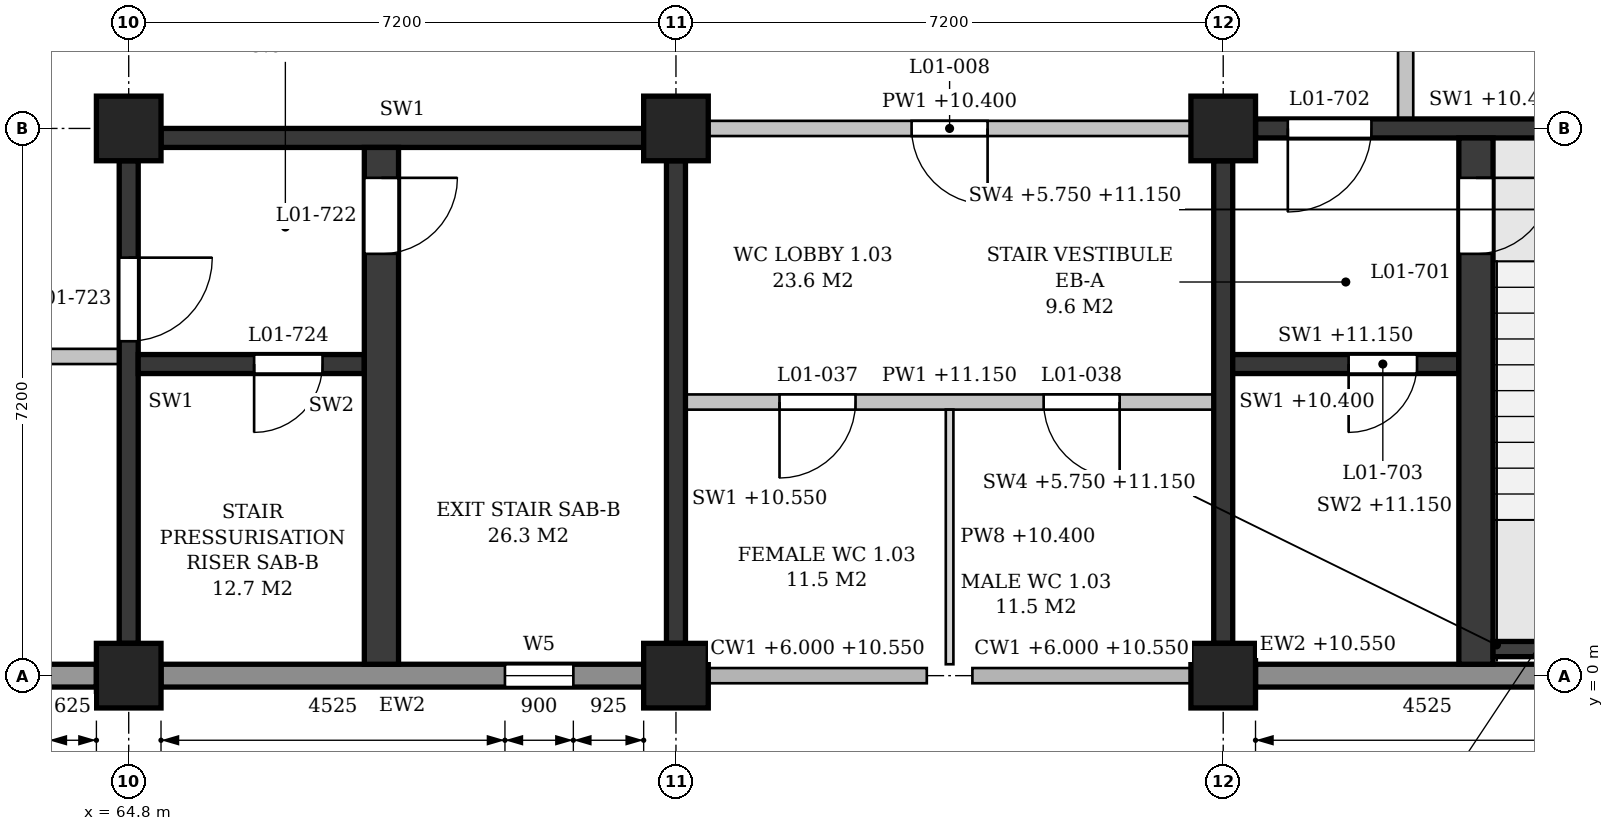
"""IFC4 building model, lengths in metres.
Left out: names, types, materials, properties, quantities, classifications, styles, units other than length and angle.
Written with IfcOpenShell. Run it as: python <this file> out.ifc"""

import sys

from ifc_helpers import new_model, si_unit, direction, frame, frame_2d, origin, origin_2d, place, context, subcontext, project, spatial, polyline, rectangle, outline, extrude, element, fill, save


model = new_model("IFC4")
c1 = context("Model", 3, precision=1e-05, world=origin(), true_north=direction((0.0, 1.0)))
c2 = subcontext(c1, "Body", "Model", "MODEL_VIEW")
j1 = project(units=[si_unit("LENGTHUNIT", "METRE"), si_unit("PLANEANGLEUNIT", "RADIAN")], contexts=[c1])
p1 = place(None, origin())
s1 = spatial("IfcSite", under=j1, at=p1, CompositionType="ELEMENT")
p2 = place(p1, origin())
s2 = spatial("IfcBuilding", under=s1, at=p2, CompositionType="ELEMENT")
p3 = place(p2, frame((0.0, 0.0, 6.0)))
s3 = spatial("IfcBuildingStorey", under=s2, at=p3, CompositionType="ELEMENT", Elevation=6.0)
for number, where, z_axis, x_axis in (
    (1, (64.8, 0.0, 0.0), (0.0, 0.0, 1.0), (1.0, 0.0, 0.0)),
    (2, (64.8, 7.2, 0.0), (0.0, 0.0, 1.0), (1.0, 0.0, 0.0)),
    (3, (72.0, 0.0, 0.0), (0.0, 0.0, 1.0), (1.0, 0.0, 0.0)),
    (4, (72.0, 7.2, 0.0), (0.0, 0.0, 1.0), (1.0, 0.0, 0.0)),
    (5, (79.2, 0.0, 0.0), (0.0, 0.0, 1.0), (1.0, 0.0, 0.0)),
    (6, (79.2, 7.2, 0.0), (0.0, 0.0, 1.0), (1.0, 0.0, 0.0)),
):
    element("IfcColumn", number, at=place(p3, frame(where, z_axis=z_axis, x_axis=x_axis)), inside=s3, PredefinedType="COLUMN", context=c2, shape_type="SweptSolid", body=[
        extrude(rectangle(XDim=0.85, YDim=0.85, at=origin_2d()), origin(), (0.0, 0.0, 1.0), 5.4),
    ])
p4 = place(p3, frame((58.025, 0.0, 0.0), z_axis=(0.0, 0.0, 1.0), x_axis=(1.0, 0.0, 0.0)))
e7 = element("IfcWall", 7, at=p4, inside=s3, PredefinedType="STANDARD", context=c2, shape_type="SweptSolid", body=[
    extrude(rectangle(XDim=6.35, YDim=0.3, at=frame_2d((3.175, 0.0))), origin(), (0.0, 0.0, 1.0), 4.7),
])
p5 = place(p4, frame((0.625, 0.0, 0.9)))
e8 = element("IfcOpeningElement", 8, at=p5, cuts=e7, PredefinedType="OPENING", context=c2, shape_type="SweptSolid", body=[
    extrude(outline(polyline([(0.0, 0.0), (1.5, 0.0), (1.5, 2.85), (0.75, 3.6), (0.0, 2.85), (0.0, 0.0)])), frame((0.0, 0.16, 0.0), z_axis=(0.0, -1.0, 0.0), x_axis=(1.0, 0.0, 0.0)), (0.0, 0.0, 1.0), 0.32),
])
p6 = place(p4, frame((4.225, 0.0, 0.9)))
e9 = element("IfcOpeningElement", 9, at=p6, cuts=e7, PredefinedType="OPENING", context=c2, shape_type="SweptSolid", body=[
    extrude(outline(polyline([(0.0, 0.0), (1.5, 0.0), (1.5, 2.85), (0.75, 3.6), (0.0, 2.85), (0.0, 0.0)])), frame((0.0, 0.16, 0.0), z_axis=(0.0, -1.0, 0.0), x_axis=(1.0, 0.0, 0.0)), (0.0, 0.0, 1.0), 0.32),
])
p7 = place(p3, frame((65.225, 0.0, 0.0), z_axis=(0.0, 0.0, 1.0), x_axis=(1.0, 0.0, 0.0)))
e10 = element("IfcWall", 10, at=p7, inside=s3, PredefinedType="STANDARD", context=c2, shape_type="SweptSolid", body=[
    extrude(rectangle(XDim=6.35, YDim=0.3, at=frame_2d((3.175, 0.0))), origin(), (0.0, 0.0, 1.0), 4.7),
])
p8 = place(p7, frame((4.525, 0.0, 0.9)))
e11 = element("IfcOpeningElement", 11, at=p8, cuts=e10, PredefinedType="OPENING", context=c2, shape_type="SweptSolid", body=[
    extrude(outline(polyline([(0.0, 0.0), (0.9, 0.0), (0.9, 3.15), (0.45, 3.6), (0.0, 3.15), (0.0, 0.0)])), frame((0.0, 0.16, 0.0), z_axis=(0.0, -1.0, 0.0), x_axis=(1.0, 0.0, 0.0)), (0.0, 0.0, 1.0), 0.32),
])
p9 = place(p3, frame((79.625, 0.0, 0.0), z_axis=(0.0, 0.0, 1.0), x_axis=(1.0, 0.0, 0.0)))
e12 = element("IfcWall", 12, at=p9, inside=s3, PredefinedType="STANDARD", context=c2, shape_type="SweptSolid", body=[
    extrude(rectangle(XDim=6.35, YDim=0.3, at=frame_2d((3.175, 0.0))), origin(), (0.0, 0.0, 1.0), 4.55),
])
p10 = place(p9, frame((4.525, 0.0, 0.9)))
e13 = element("IfcOpeningElement", 13, at=p10, cuts=e12, PredefinedType="OPENING", context=c2, shape_type="SweptSolid", body=[
    extrude(outline(polyline([(0.0, 0.0), (0.9, 0.0), (0.9, 3.15), (0.45, 3.6), (0.0, 3.15), (0.0, 0.0)])), frame((0.0, 0.16, 0.0), z_axis=(0.0, -1.0, 0.0), x_axis=(1.0, 0.0, 0.0)), (0.0, 0.0, 1.0), 0.32),
])
p11 = place(p3, frame((79.625, 7.2, 0.0), z_axis=(0.0, 0.0, 1.0), x_axis=(1.0, 0.0, 0.0)))
e14 = element("IfcWall", 14, at=p11, inside=s3, PredefinedType="SHEAR", context=c2, shape_type="SweptSolid", body=[
    extrude(rectangle(XDim=6.35, YDim=0.25, at=frame_2d((3.175, 0.0))), origin(), (0.0, 0.0, 1.0), 4.4),
])
p12 = place(p11, frame((0.425, 0.0, 0.0)))
e15 = element("IfcOpeningElement", 15, at=p12, cuts=e14, PredefinedType="OPENING", context=c2, shape_type="SweptSolid", body=[
    extrude(rectangle(XDim=1.1, YDim=2.1, at=frame_2d((0.55, 1.05))), frame((0.0, 0.135, 0.0), z_axis=(0.0, -1.0, 0.0), x_axis=(1.0, 0.0, 0.0)), (0.0, 0.0, 1.0), 0.27),
])
p13 = place(p3, frame((79.2, 0.425, 0.0), z_axis=(0.0, 0.0, 1.0), x_axis=(0.0, 1.0, 0.0)))
e16 = element("IfcWall", 16, at=p13, inside=s3, PredefinedType="SHEAR", context=c2, shape_type="SweptSolid", body=[
    extrude(rectangle(XDim=6.35, YDim=0.25, at=frame_2d((3.175, 0.0))), origin(), (0.0, 0.0, 1.0), 4.4),
])
p14 = place(p3, frame((82.75, 0.35, -0.25), z_axis=(0.0, 0.0, 1.0), x_axis=(1.0, 0.0, 0.0)))
e17 = element("IfcWall", 17, at=p14, inside=s3, PredefinedType="SHEAR", context=c2, shape_type="SweptSolid", body=[
    extrude(rectangle(XDim=1.4, YDim=0.2, at=frame_2d((0.7, 0.0))), origin(), (0.0, 0.0, 1.0), 5.4),
])
p15 = place(p3, frame((82.525, 0.15, 0.0), z_axis=(0.0, 0.0, 1.0), x_axis=(0.0, 1.0, 0.0)))
e18 = element("IfcWall", 18, at=p15, inside=s3, PredefinedType="SHEAR", context=c2, shape_type="SweptSolid", body=[
    extrude(rectangle(XDim=6.925, YDim=0.45, at=frame_2d((3.462, 0.0))), origin(), (0.0, 0.0, 1.0), 5.15),
])
p16 = place(p15, frame((5.4, 0.0, 0.0)))
e19 = element("IfcOpeningElement", 19, at=p16, cuts=e18, PredefinedType="OPENING", context=c2, shape_type="SweptSolid", body=[
    extrude(rectangle(XDim=1.0, YDim=2.1, at=frame_2d((0.5, 1.05))), frame((0.0, 0.235, 0.0), z_axis=(0.0, -1.0, 0.0), x_axis=(1.0, 0.0, 0.0)), (0.0, 0.0, 1.0), 0.47),
])
p17 = place(p3, frame((79.325, 4.1, 0.0), z_axis=(0.0, 0.0, 1.0), x_axis=(1.0, 0.0, 0.0)))
e20 = element("IfcWall", 20, at=p17, inside=s3, PredefinedType="SHEAR", context=c2, shape_type="SweptSolid", body=[
    extrude(rectangle(XDim=2.975, YDim=0.25, at=frame_2d((1.488, 0.0))), origin(), (0.0, 0.0, 1.0), 5.15),
])
p18 = place(p17, frame((1.525, 0.0, 0.0)))
e21 = element("IfcOpeningElement", 21, at=p18, cuts=e20, PredefinedType="OPENING", context=c2, shape_type="SweptSolid", body=[
    extrude(rectangle(XDim=0.9, YDim=2.1, at=frame_2d((0.45, 1.05))), frame((0.0, 0.135, 0.0), z_axis=(0.0, -1.0, 0.0), x_axis=(1.0, 0.0, 0.0)), (0.0, 0.0, 1.0), 0.27),
])
p19 = place(p3, frame((65.225, 7.075, 0.0), z_axis=(0.0, 0.0, 1.0), x_axis=(1.0, 0.0, 0.0)))
e22 = element("IfcWall", 22, at=p19, inside=s3, PredefinedType="SHEAR", context=c2, shape_type="SweptSolid", body=[
    extrude(rectangle(XDim=6.35, YDim=0.25, at=frame_2d((3.175, 0.0))), origin(), (0.0, 0.0, 1.0), 4.7),
])
p20 = place(p3, frame((72.0, 0.425, 0.0), z_axis=(0.0, 0.0, 1.0), x_axis=(0.0, 1.0, 0.0)))
e23 = element("IfcWall", 23, at=p20, inside=s3, PredefinedType="SHEAR", context=c2, shape_type="SweptSolid", body=[
    extrude(rectangle(XDim=6.35, YDim=0.25, at=frame_2d((3.175, 0.0))), origin(), (0.0, 0.0, 1.0), 4.55),
])
p21 = place(p3, frame((64.8, 0.425, 0.0), z_axis=(0.0, 0.0, 1.0), x_axis=(0.0, 1.0, 0.0)))
e24 = element("IfcWall", 24, at=p21, inside=s3, PredefinedType="SHEAR", context=c2, shape_type="SweptSolid", body=[
    extrude(rectangle(XDim=6.35, YDim=0.25, at=frame_2d((3.175, 0.0))), origin(), (0.0, 0.0, 1.0), 4.7),
])
p22 = place(p21, frame((3.975, 0.0, 0.0)))
e25 = element("IfcOpeningElement", 25, at=p22, cuts=e24, PredefinedType="OPENING", context=c2, shape_type="SweptSolid", body=[
    extrude(rectangle(XDim=1.1, YDim=2.1, at=frame_2d((0.55, 1.05))), frame((0.0, 0.135, 0.0), z_axis=(0.0, -1.0, 0.0), x_axis=(1.0, 0.0, 0.0)), (0.0, 0.0, 1.0), 0.27),
])
p23 = place(p3, frame((68.125, 0.15, 0.0), z_axis=(0.0, 0.0, 1.0), x_axis=(0.0, 1.0, 0.0)))
e26 = element("IfcWall", 26, at=p23, inside=s3, PredefinedType="SHEAR", context=c2, shape_type="SweptSolid", body=[
    extrude(rectangle(XDim=6.8, YDim=0.45, at=frame_2d((3.4, 0.0))), origin(), (0.0, 0.0, 1.0), 4.7),
])
p24 = place(p23, frame((5.4, 0.0, 0.0)))
e27 = element("IfcOpeningElement", 27, at=p24, cuts=e26, PredefinedType="OPENING", context=c2, shape_type="SweptSolid", body=[
    extrude(rectangle(XDim=1.0, YDim=2.1, at=frame_2d((0.5, 1.05))), frame((0.0, 0.235, 0.0), z_axis=(0.0, -1.0, 0.0), x_axis=(1.0, 0.0, 0.0)), (0.0, 0.0, 1.0), 0.47),
])
p25 = place(p3, frame((64.925, 4.1, 0.0), z_axis=(0.0, 0.0, 1.0), x_axis=(1.0, 0.0, 0.0)))
e28 = element("IfcWall", 28, at=p25, inside=s3, PredefinedType="SHEAR", context=c2, shape_type="SweptSolid", body=[
    extrude(rectangle(XDim=2.975, YDim=0.25, at=frame_2d((1.487, 0.0))), origin(), (0.0, 0.0, 1.0), 4.7),
])
p26 = place(p25, frame((1.525, 0.0, 0.0)))
e29 = element("IfcOpeningElement", 29, at=p26, cuts=e28, PredefinedType="OPENING", context=c2, shape_type="SweptSolid", body=[
    extrude(rectangle(XDim=0.9, YDim=2.1, at=frame_2d((0.45, 1.05))), frame((0.0, 0.135, 0.0), z_axis=(0.0, -1.0, 0.0), x_axis=(1.0, 0.0, 0.0)), (0.0, 0.0, 1.0), 0.27),
])
p27 = place(p2, origin())
s4 = spatial("IfcBuildingStorey", under=s2, at=p27, CompositionType="ELEMENT", Elevation=0.0)
p28 = place(p27, frame((58.025, 7.4, 0.0), z_axis=(0.0, 0.0, 1.0), x_axis=(1.0, 0.0, 0.0)))
e30 = element("IfcWall", 30, at=p28, inside=s4, PredefinedType="SOLIDWALL", context=c2, shape_type="SweptSolid", body=[
    extrude(rectangle(XDim=6.35, YDim=0.4, at=frame_2d((3.175, 0.0))), origin(), (0.0, 0.0, 1.0), 10.7),
])
p29 = place(p28, frame((2.575, 0.0, 0.0)))
e31 = element("IfcOpeningElement", 31, at=p29, cuts=e30, PredefinedType="OPENING", context=c2, shape_type="SweptSolid", body=[
    extrude(rectangle(XDim=1.2, YDim=2.1, at=frame_2d((0.6, 1.05))), frame((0.0, 0.21, 0.0), z_axis=(0.0, -1.0, 0.0), x_axis=(1.0, 0.0, 0.0)), (0.0, 0.0, 1.0), 0.42),
])
p30 = place(p27, frame((65.225, 7.4, 0.0), z_axis=(0.0, 0.0, 1.0), x_axis=(1.0, 0.0, 0.0)))
e32 = element("IfcWall", 32, at=p30, inside=s4, PredefinedType="SOLIDWALL", context=c2, shape_type="SweptSolid", body=[
    extrude(rectangle(XDim=6.35, YDim=0.4, at=frame_2d((3.175, 0.0))), origin(), (0.0, 0.0, 1.0), 10.7),
])
p31 = place(p27, frame((71.8, 7.625, 0.0), z_axis=(0.0, 0.0, 1.0), x_axis=(0.0, 1.0, 0.0)))
e33 = element("IfcWall", 33, at=p31, inside=s4, PredefinedType="SOLIDWALL", context=c2, shape_type="SweptSolid", body=[
    extrude(rectangle(XDim=6.35, YDim=0.4, at=frame_2d((3.175, 0.0))), origin(), (0.0, 0.0, 1.0), 10.55),
])
p32 = place(p3, frame((72.125, 3.6, 0.0), z_axis=(0.0, 0.0, 1.0), x_axis=(1.0, 0.0, 0.0)))
e34 = element("IfcWall", 34, at=p32, inside=s3, PredefinedType="PARTITIONING", context=c2, shape_type="SweptSolid", body=[
    extrude(outline(polyline([(0.0, 0.0), (6.95, 0.0), (6.95, 4.4), (6.825, 4.4), (6.825, 5.15), (0.125, 5.15), (0.125, 4.55), (0.0, 4.55), (0.0, 0.0)])), frame((0.0, 0.1, 0.0), z_axis=(0.0, -1.0, 0.0), x_axis=(1.0, 0.0, 0.0)), (0.0, 0.0, 1.0), 0.2),
])
p33 = place(p32, frame((1.238, 0.0, 0.0)))
e35 = element("IfcOpeningElement", 35, at=p33, cuts=e34, PredefinedType="OPENING", context=c2, shape_type="SweptSolid", body=[
    extrude(rectangle(XDim=1.0, YDim=2.1, at=frame_2d((0.5, 1.05))), frame((0.0, 0.11, 0.0), z_axis=(0.0, -1.0, 0.0), x_axis=(1.0, 0.0, 0.0)), (0.0, 0.0, 1.0), 0.22),
])
p34 = place(p32, frame((4.712, 0.0, 0.0)))
e36 = element("IfcOpeningElement", 36, at=p34, cuts=e34, PredefinedType="OPENING", context=c2, shape_type="SweptSolid", body=[
    extrude(rectangle(XDim=1.0, YDim=2.1, at=frame_2d((0.5, 1.05))), frame((0.0, 0.11, 0.0), z_axis=(0.0, -1.0, 0.0), x_axis=(1.0, 0.0, 0.0)), (0.0, 0.0, 1.0), 0.22),
])
p35 = place(p3, frame((57.6, 4.2, 0.0), z_axis=(0.0, 0.0, 1.0), x_axis=(1.0, 0.0, 0.0)))
e37 = element("IfcWall", 37, at=p35, inside=s3, PredefinedType="PARTITIONING", context=c2, shape_type="SweptSolid", body=[
    extrude(rectangle(XDim=7.075, YDim=0.2, at=frame_2d((3.538, 0.0))), origin(), (0.0, 0.0, 1.0), 4.7),
])
p36 = place(p3, frame((72.425, 7.2, 0.0), z_axis=(0.0, 0.0, 1.0), x_axis=(1.0, 0.0, 0.0)))
e38 = element("IfcWall", 38, at=p36, inside=s3, PredefinedType="PARTITIONING", context=c2, shape_type="SweptSolid", body=[
    extrude(rectangle(XDim=6.35, YDim=0.2, at=frame_2d((3.175, 0.0))), origin(), (0.0, 0.0, 1.0), 4.4),
])
p37 = place(p36, frame((2.675, 0.0, 0.0)))
e39 = element("IfcOpeningElement", 39, at=p37, cuts=e38, PredefinedType="OPENING", context=c2, shape_type="SweptSolid", body=[
    extrude(rectangle(XDim=1.0, YDim=2.1, at=frame_2d((0.5, 1.05))), frame((0.0, 0.11, 0.0), z_axis=(0.0, -1.0, 0.0), x_axis=(1.0, 0.0, 0.0)), (0.0, 0.0, 1.0), 0.22),
])
p38 = place(p3, frame((75.6, 0.15, 0.0), z_axis=(0.0, 0.0, 1.0), x_axis=(0.0, 1.0, 0.0)))
e40 = element("IfcWall", 40, at=p38, inside=s3, PredefinedType="PARTITIONING", context=c2, shape_type="SweptSolid", body=[
    extrude(rectangle(XDim=3.35, YDim=0.1, at=frame_2d((1.675, 0.0))), origin(), (0.0, 0.0, 1.0), 4.4),
])
p39 = place(p3, frame((81.6, 7.325, 0.0), z_axis=(0.0, 0.0, 1.0), x_axis=(0.0, 1.0, 0.0)))
e41 = element("IfcWall", 41, at=p39, inside=s3, PredefinedType="PARTITIONING", context=c2, shape_type="SweptSolid", body=[
    extrude(outline(polyline([(0.0, 0.0), (7.075, 0.0), (7.075, 4.4), (6.825, 4.4), (6.825, 5.15), (0.125, 5.15), (0.125, 4.4), (0.0, 4.4), (0.0, 0.0)])), frame((0.0, 0.1, 0.0), z_axis=(0.0, -1.0, 0.0), x_axis=(1.0, 0.0, 0.0)), (0.0, 0.0, 1.0), 0.2),
])
p40 = place(p39, frame((3.037, 0.0, 0.0)))
e42 = element("IfcOpeningElement", 42, at=p40, cuts=e41, PredefinedType="OPENING", context=c2, shape_type="SweptSolid", body=[
    extrude(rectangle(XDim=1.0, YDim=2.1, at=frame_2d((0.5, 1.05))), frame((0.0, 0.11, 0.0), z_axis=(0.0, -1.0, 0.0), x_axis=(1.0, 0.0, 0.0)), (0.0, 0.0, 1.0), 0.22),
])
p41 = place(p8, origin())
e43 = element("IfcWindow", 43, at=p41, inside=s3, PartitioningType="SINGLE_PANEL", PredefinedType="WINDOW", context=c2, shape_type="SweptSolid", body=[
    extrude(outline(polyline([(0.0, 0.0), (0.9, 0.0), (0.9, 3.15), (0.45, 3.6), (0.0, 3.15), (0.0, 0.0)])), frame((0.0, 0.03, 0.0), z_axis=(0.0, -1.0, 0.0), x_axis=(1.0, 0.0, 0.0)), (0.0, 0.0, 1.0), 0.06),
])
fill(e11, e43)
p42 = place(p16, frame((1.0, 0.0, 0.0), z_axis=(0.0, 0.0, 1.0), x_axis=(-1.0, 0.0, 0.0)))
e44 = element("IfcDoor", 44, at=p42, inside=s3, OperationType="SINGLE_SWING_LEFT", PredefinedType="DOOR", context=c2, shape_type="SweptSolid", body=[
    extrude(rectangle(XDim=1.0, YDim=2.1, at=frame_2d((0.5, 1.05))), frame((0.0, 0.025, 0.0), z_axis=(0.0, -1.0, 0.0), x_axis=(1.0, 0.0, 0.0)), (0.0, 0.0, 1.0), 0.05),
])
fill(e19, e44)
p43 = place(p12, frame((1.1, 0.0, 0.0), z_axis=(0.0, 0.0, 1.0), x_axis=(-1.0, 0.0, 0.0)))
e45 = element("IfcDoor", 45, at=p43, inside=s3, OperationType="SINGLE_SWING_RIGHT", PredefinedType="DOOR", context=c2, shape_type="SweptSolid", body=[
    extrude(rectangle(XDim=1.1, YDim=2.1, at=frame_2d((0.55, 1.05))), frame((0.0, 0.025, 0.0), z_axis=(0.0, -1.0, 0.0), x_axis=(1.0, 0.0, 0.0)), (0.0, 0.0, 1.0), 0.05),
])
fill(e15, e45)
p44 = place(p18, frame((0.9, 0.0, 0.0), z_axis=(0.0, 0.0, 1.0), x_axis=(-1.0, 0.0, 0.0)))
e46 = element("IfcDoor", 46, at=p44, inside=s3, OperationType="SINGLE_SWING_RIGHT", PredefinedType="DOOR", context=c2, shape_type="SweptSolid", body=[
    extrude(rectangle(XDim=0.9, YDim=2.1, at=frame_2d((0.45, 1.05))), frame((0.0, 0.025, 0.0), z_axis=(0.0, -1.0, 0.0), x_axis=(1.0, 0.0, 0.0)), (0.0, 0.0, 1.0), 0.05),
])
fill(e21, e46)
p45 = place(p24, frame((1.0, 0.0, 0.0), z_axis=(0.0, 0.0, 1.0), x_axis=(-1.0, 0.0, 0.0)))
e47 = element("IfcDoor", 47, at=p45, inside=s3, OperationType="SINGLE_SWING_LEFT", PredefinedType="DOOR", context=c2, shape_type="SweptSolid", body=[
    extrude(rectangle(XDim=1.0, YDim=2.1, at=frame_2d((0.5, 1.05))), frame((0.0, 0.025, 0.0), z_axis=(0.0, -1.0, 0.0), x_axis=(1.0, 0.0, 0.0)), (0.0, 0.0, 1.0), 0.05),
])
fill(e27, e47)
p46 = place(p22, frame((1.1, 0.0, 0.0), z_axis=(0.0, 0.0, 1.0), x_axis=(-1.0, 0.0, 0.0)))
e48 = element("IfcDoor", 48, at=p46, inside=s3, OperationType="SINGLE_SWING_LEFT", PredefinedType="DOOR", context=c2, shape_type="SweptSolid", body=[
    extrude(rectangle(XDim=1.1, YDim=2.1, at=frame_2d((0.55, 1.05))), frame((0.0, 0.025, 0.0), z_axis=(0.0, -1.0, 0.0), x_axis=(1.0, 0.0, 0.0)), (0.0, 0.0, 1.0), 0.05),
])
fill(e25, e48)
p47 = place(p26, frame((0.9, 0.0, 0.0), z_axis=(0.0, 0.0, 1.0), x_axis=(-1.0, 0.0, 0.0)))
e49 = element("IfcDoor", 49, at=p47, inside=s3, OperationType="SINGLE_SWING_RIGHT", PredefinedType="DOOR", context=c2, shape_type="SweptSolid", body=[
    extrude(rectangle(XDim=0.9, YDim=2.1, at=frame_2d((0.45, 1.05))), frame((0.0, 0.025, 0.0), z_axis=(0.0, -1.0, 0.0), x_axis=(1.0, 0.0, 0.0)), (0.0, 0.0, 1.0), 0.05),
])
fill(e29, e49)
p48 = place(p37, frame((1.0, 0.0, 0.0), z_axis=(0.0, 0.0, 1.0), x_axis=(-1.0, 0.0, 0.0)))
e50 = element("IfcDoor", 50, at=p48, inside=s3, OperationType="SINGLE_SWING_LEFT", PredefinedType="DOOR", context=c2, shape_type="SweptSolid", body=[
    extrude(rectangle(XDim=1.0, YDim=2.1, at=frame_2d((0.5, 1.05))), frame((0.0, 0.025, 0.0), z_axis=(0.0, -1.0, 0.0), x_axis=(1.0, 0.0, 0.0)), (0.0, 0.0, 1.0), 0.05),
])
fill(e39, e50)
p49 = place(p33, frame((1.0, 0.0, 0.0), z_axis=(0.0, 0.0, 1.0), x_axis=(-1.0, 0.0, 0.0)))
e51 = element("IfcDoor", 51, at=p49, inside=s3, OperationType="SINGLE_SWING_RIGHT", PredefinedType="DOOR", context=c2, shape_type="SweptSolid", body=[
    extrude(rectangle(XDim=1.0, YDim=2.1, at=frame_2d((0.5, 1.05))), frame((0.0, 0.025, 0.0), z_axis=(0.0, -1.0, 0.0), x_axis=(1.0, 0.0, 0.0)), (0.0, 0.0, 1.0), 0.05),
])
fill(e35, e51)
p50 = place(p34, frame((1.0, 0.0, 0.0), z_axis=(0.0, 0.0, 1.0), x_axis=(-1.0, 0.0, 0.0)))
e52 = element("IfcDoor", 52, at=p50, inside=s3, OperationType="SINGLE_SWING_LEFT", PredefinedType="DOOR", context=c2, shape_type="SweptSolid", body=[
    extrude(rectangle(XDim=1.0, YDim=2.1, at=frame_2d((0.5, 1.05))), frame((0.0, 0.025, 0.0), z_axis=(0.0, -1.0, 0.0), x_axis=(1.0, 0.0, 0.0)), (0.0, 0.0, 1.0), 0.05),
])
fill(e36, e52)
save(model, sys.argv[1])
